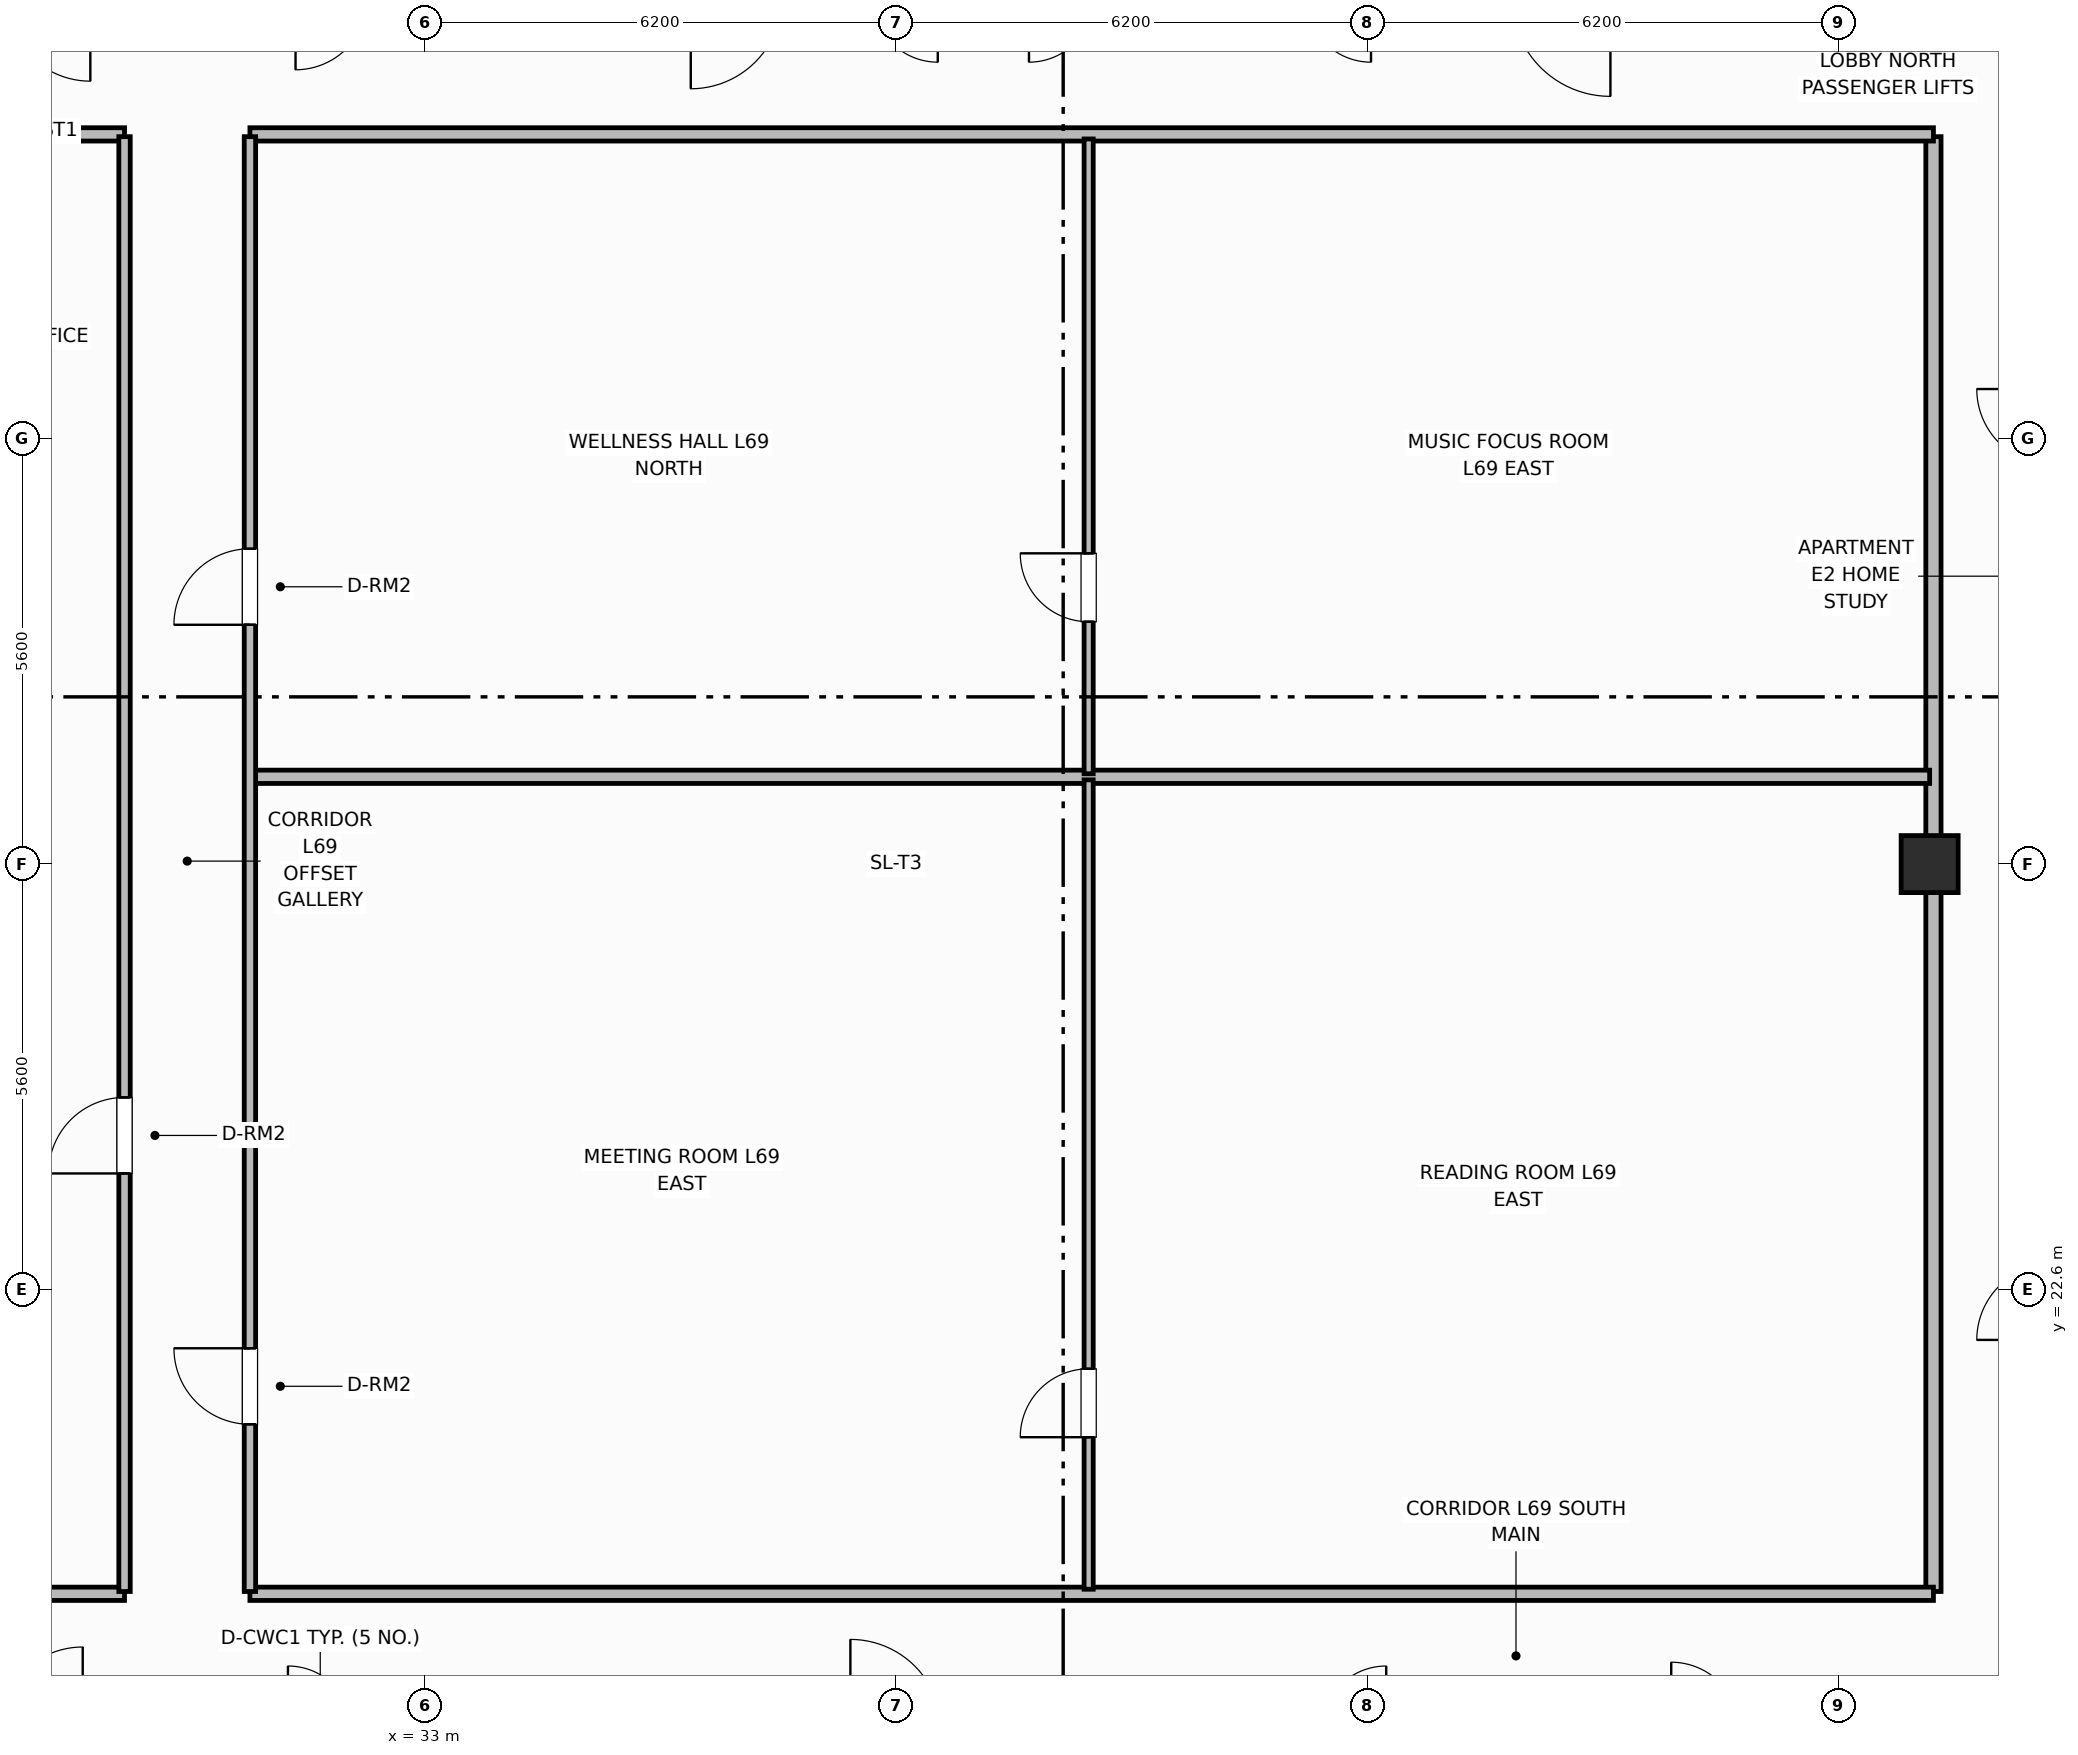
"""IFC4 building model, lengths in metres.
Left out: names, types, materials, properties, quantities, classifications, styles, units other than length and angle.
Written with IfcOpenShell. Run it as: python <this file> out.ifc"""

import sys

from ifc_helpers import new_model, si_unit, direction, frame, frame_2d, origin, origin_2d, place, context, subcontext, project, spatial, rectangle, extrude, element, fill, save


model = new_model("IFC4")
c1 = context("Model", 3, precision=1e-05, world=origin(), true_north=direction((0.0, 1.0)))
c2 = subcontext(c1, "Body", "Model", "MODEL_VIEW")
j1 = project(units=[si_unit("LENGTHUNIT", "METRE"), si_unit("PLANEANGLEUNIT", "RADIAN")], contexts=[c1])
p1 = place(None, origin())
s1 = spatial("IfcSite", under=j1, at=p1, CompositionType="ELEMENT")
p2 = place(p1, origin())
s2 = spatial("IfcBuilding", under=s1, at=p2, CompositionType="ELEMENT")
p3 = place(p2, frame((0.0, 0.0, 275.0)))
s3 = spatial("IfcBuildingStorey", under=s2, at=p3, CompositionType="ELEMENT", Elevation=275.0)
p4 = place(p3, frame((52.8, 28.2, 0.0), z_axis=(0.0, 0.0, 1.0), x_axis=(1.0, 0.0, 0.0)))
e1 = element("IfcColumn", 1, at=p4, inside=s3, PredefinedType="COLUMN", context=c2, shape_type="SweptSolid", body=[
    extrude(rectangle(XDim=0.75, YDim=0.75, at=origin_2d()), origin(), (0.0, 0.0, 1.0), 3.7),
])
p5 = place(p3, frame((52.85, 18.63, 0.0), z_axis=(0.0, 0.0, 1.0), x_axis=(0.0, 1.0, 0.0)))
e2 = element("IfcWall", 2, at=p5, inside=s3, PredefinedType="PARTITIONING", context=c2, shape_type="SweptSolid", body=[
    extrude(rectangle(XDim=19.14, YDim=0.2, at=frame_2d((9.57, 0.0))), origin(), (0.0, 0.0, 1.0), 2.56),
])
p6 = place(p3, frame((25.55, 18.6, 0.0), z_axis=(0.0, 0.0, 1.0), x_axis=(1.0, 0.0, 0.0)))
e3 = element("IfcWall", 3, at=p6, inside=s3, PredefinedType="PARTITIONING", context=c2, shape_type="SweptSolid", body=[
    extrude(rectangle(XDim=3.5, YDim=0.175, at=frame_2d((1.75, 0.0))), origin(), (0.0, 0.0, 1.0), 2.56),
])
p7 = place(p3, frame((30.7, 18.6, 0.0), z_axis=(0.0, 0.0, 1.0), x_axis=(1.0, 0.0, 0.0)))
e4 = element("IfcWall", 4, at=p7, inside=s3, PredefinedType="PARTITIONING", context=c2, shape_type="SweptSolid", body=[
    extrude(rectangle(XDim=22.15, YDim=0.175, at=frame_2d((11.075, 0.0))), origin(), (0.0, 0.0, 1.0), 2.56),
])
p8 = place(p3, frame((25.55, 37.8, 0.0), z_axis=(0.0, 0.0, 1.0), x_axis=(1.0, 0.0, 0.0)))
e5 = element("IfcWall", 5, at=p8, inside=s3, PredefinedType="PARTITIONING", context=c2, shape_type="SweptSolid", body=[
    extrude(rectangle(XDim=3.5, YDim=0.175, at=frame_2d((1.75, 0.0))), origin(), (0.0, 0.0, 1.0), 2.56),
])
p9 = place(p3, frame((30.7, 37.8, 0.0), z_axis=(0.0, 0.0, 1.0), x_axis=(1.0, 0.0, 0.0)))
e6 = element("IfcWall", 6, at=p9, inside=s3, PredefinedType="PARTITIONING", context=c2, shape_type="SweptSolid", body=[
    extrude(rectangle(XDim=22.15, YDim=0.175, at=frame_2d((11.075, 0.0))), origin(), (0.0, 0.0, 1.0), 2.56),
])
p10 = place(p3, frame((30.73, 29.348, 0.0), z_axis=(0.0, 0.0, 1.0), x_axis=(1.0, 0.0, 0.0)))
e7 = element("IfcWall", 7, at=p10, inside=s3, PredefinedType="PARTITIONING", context=c2, shape_type="SweptSolid", body=[
    extrude(rectangle(XDim=22.07, YDim=0.175, at=frame_2d((11.035, 0.0))), origin(), (0.0, 0.0, 1.0), 2.56),
])
p11 = place(p3, frame((41.735, 18.66, 0.0), z_axis=(0.0, 0.0, 1.0), x_axis=(0.0, 1.0, 0.0)))
e8 = element("IfcWall", 8, at=p11, inside=s3, PredefinedType="PARTITIONING", context=c2, shape_type="SweptSolid", body=[
    extrude(rectangle(XDim=10.648, YDim=0.12, at=frame_2d((5.324, 0.0))), origin(), (0.0, 0.0, 1.0), 2.56),
])
p12 = place(p11, frame((2.0, 0.0, 0.0)))
e9 = element("IfcOpeningElement", 9, at=p12, cuts=e8, PredefinedType="OPENING", context=c2, shape_type="SweptSolid", body=[
    extrude(rectangle(XDim=0.9, YDim=2.1, at=frame_2d((0.45, 1.05))), frame((0.0, 0.07, 0.0), z_axis=(0.0, -1.0, 0.0), x_axis=(1.0, 0.0, 0.0)), (0.0, 0.0, 1.0), 0.14),
])
p13 = place(p3, frame((41.735, 29.388, 0.0), z_axis=(0.0, 0.0, 1.0), x_axis=(0.0, 1.0, 0.0)))
e10 = element("IfcWall", 10, at=p13, inside=s3, PredefinedType="PARTITIONING", context=c2, shape_type="SweptSolid", body=[
    extrude(rectangle(XDim=8.352, YDim=0.12, at=frame_2d((4.176, 0.0))), origin(), (0.0, 0.0, 1.0), 2.56),
])
p14 = place(p13, frame((2.0, 0.0, 0.0)))
e11 = element("IfcOpeningElement", 11, at=p14, cuts=e10, PredefinedType="OPENING", context=c2, shape_type="SweptSolid", body=[
    extrude(rectangle(XDim=0.9, YDim=2.1, at=frame_2d((0.45, 1.05))), frame((0.0, 0.07, 0.0), z_axis=(0.0, -1.0, 0.0), x_axis=(1.0, 0.0, 0.0)), (0.0, 0.0, 1.0), 0.14),
])
p15 = place(p3, frame((29.05, 18.63, 0.0), z_axis=(0.0, 0.0, 1.0), x_axis=(0.0, 1.0, 0.0)))
e12 = element("IfcWall", 12, at=p15, inside=s3, PredefinedType="PARTITIONING", context=c2, shape_type="SweptSolid", body=[
    extrude(rectangle(XDim=19.14, YDim=0.15, at=frame_2d((9.57, 0.0))), origin(), (0.0, 0.0, 1.0), 2.56),
])
p16 = place(p15, frame((5.5, 0.0, 0.0)))
e13 = element("IfcOpeningElement", 13, at=p16, cuts=e12, PredefinedType="OPENING", context=c2, shape_type="SweptSolid", body=[
    extrude(rectangle(XDim=1.0, YDim=2.15, at=frame_2d((0.5, 1.075))), frame((0.0, 0.085, 0.0), z_axis=(0.0, -1.0, 0.0), x_axis=(1.0, 0.0, 0.0)), (0.0, 0.0, 1.0), 0.17),
])
p17 = place(p3, frame((30.7, 18.63, 0.0), z_axis=(0.0, 0.0, 1.0), x_axis=(0.0, 1.0, 0.0)))
e14 = element("IfcWall", 14, at=p17, inside=s3, PredefinedType="PARTITIONING", context=c2, shape_type="SweptSolid", body=[
    extrude(rectangle(XDim=19.14, YDim=0.15, at=frame_2d((9.57, 0.0))), origin(), (0.0, 0.0, 1.0), 2.56),
])
p18 = place(p17, frame((2.2, 0.0, 0.0)))
e15 = element("IfcOpeningElement", 15, at=p18, cuts=e14, PredefinedType="OPENING", context=c2, shape_type="SweptSolid", body=[
    extrude(rectangle(XDim=1.0, YDim=2.15, at=frame_2d((0.5, 1.075))), frame((0.0, 0.085, 0.0), z_axis=(0.0, -1.0, 0.0), x_axis=(1.0, 0.0, 0.0)), (0.0, 0.0, 1.0), 0.17),
])
p19 = place(p17, frame((12.719, 0.0, 0.0)))
e16 = element("IfcOpeningElement", 16, at=p19, cuts=e14, PredefinedType="OPENING", context=c2, shape_type="SweptSolid", body=[
    extrude(rectangle(XDim=1.0, YDim=2.15, at=frame_2d((0.5, 1.075))), frame((0.0, 0.085, 0.0), z_axis=(0.0, -1.0, 0.0), x_axis=(1.0, 0.0, 0.0)), (0.0, 0.0, 1.0), 0.17),
])
p20 = place(p12, origin())
e17 = element("IfcDoor", 17, at=p20, inside=s3, OperationType="SINGLE_SWING_LEFT", PredefinedType="DOOR", context=c2, shape_type="SweptSolid", body=[
    extrude(rectangle(XDim=0.9, YDim=2.1, at=frame_2d((0.45, 1.05))), frame((0.0, 0.025, 0.0), z_axis=(0.0, -1.0, 0.0), x_axis=(1.0, 0.0, 0.0)), (0.0, 0.0, 1.0), 0.05),
])
fill(e9, e17)
p21 = place(p14, origin())
e18 = element("IfcDoor", 18, at=p21, inside=s3, OperationType="SINGLE_SWING_RIGHT", PredefinedType="DOOR", context=c2, shape_type="SweptSolid", body=[
    extrude(rectangle(XDim=0.9, YDim=2.1, at=frame_2d((0.45, 1.05))), frame((0.0, 0.025, 0.0), z_axis=(0.0, -1.0, 0.0), x_axis=(1.0, 0.0, 0.0)), (0.0, 0.0, 1.0), 0.05),
])
fill(e11, e18)
p22 = place(p16, origin())
e19 = element("IfcDoor", 19, at=p22, inside=s3, OperationType="SINGLE_SWING_LEFT", PredefinedType="DOOR", context=c2, shape_type="SweptSolid", body=[
    extrude(rectangle(XDim=1.0, YDim=2.15, at=frame_2d((0.5, 1.075))), frame((0.0, 0.025, 0.0), z_axis=(0.0, -1.0, 0.0), x_axis=(1.0, 0.0, 0.0)), (0.0, 0.0, 1.0), 0.05),
])
fill(e13, e19)
p23 = place(p18, origin())
e20 = element("IfcDoor", 20, at=p23, inside=s3, OperationType="SINGLE_SWING_RIGHT", PredefinedType="DOOR", context=c2, shape_type="SweptSolid", body=[
    extrude(rectangle(XDim=1.0, YDim=2.15, at=frame_2d((0.5, 1.075))), frame((0.0, 0.025, 0.0), z_axis=(0.0, -1.0, 0.0), x_axis=(1.0, 0.0, 0.0)), (0.0, 0.0, 1.0), 0.05),
])
fill(e15, e20)
p24 = place(p19, origin())
e21 = element("IfcDoor", 21, at=p24, inside=s3, OperationType="SINGLE_SWING_LEFT", PredefinedType="DOOR", context=c2, shape_type="SweptSolid", body=[
    extrude(rectangle(XDim=1.0, YDim=2.15, at=frame_2d((0.5, 1.075))), frame((0.0, 0.025, 0.0), z_axis=(0.0, -1.0, 0.0), x_axis=(1.0, 0.0, 0.0)), (0.0, 0.0, 1.0), 0.05),
])
fill(e16, e21)
save(model, sys.argv[1])
